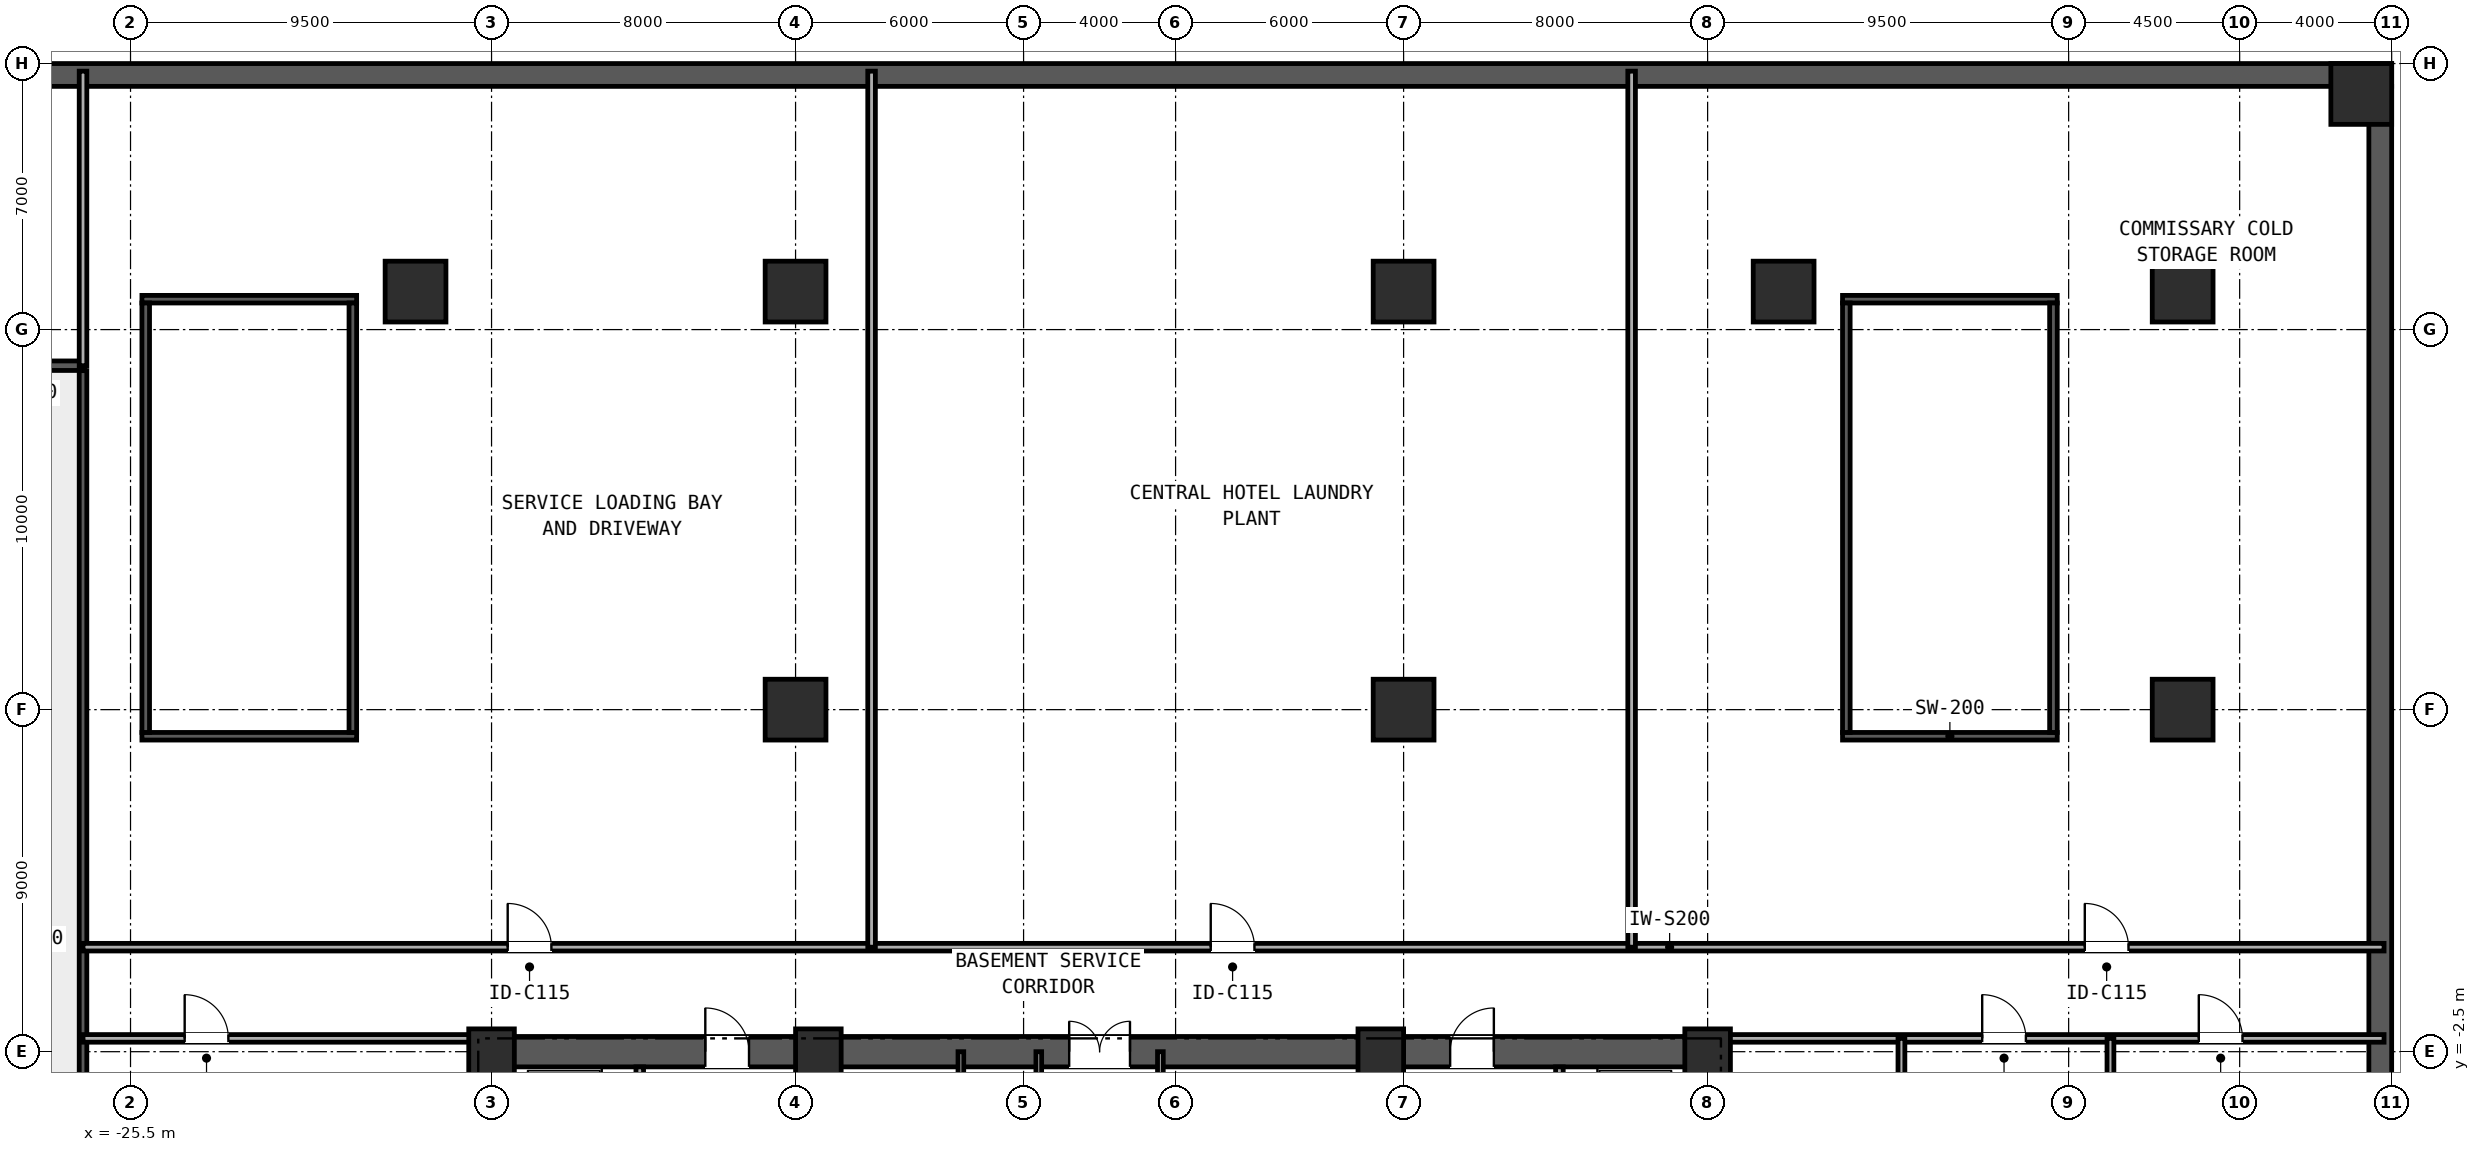
"""IFC4 building model, lengths in metres.
Left out: names, types, materials, properties, quantities, classifications, styles, units other than length and angle.
Written with IfcOpenShell. Run it as: python <this file> out.ifc"""

import sys

from ifc_helpers import new_model, si_unit, direction, frame, frame_2d, origin, origin_2d, place, context, subcontext, project, spatial, rectangle, extrude, element, fill, save


model = new_model("IFC4")
c1 = context("Model", 3, precision=1e-05, world=origin(), true_north=direction((0.0, 1.0)))
c2 = subcontext(c1, "Body", "Model", "MODEL_VIEW")
j1 = project(units=[si_unit("LENGTHUNIT", "METRE"), si_unit("PLANEANGLEUNIT", "RADIAN")], contexts=[c1])
p1 = place(None, origin())
s1 = spatial("IfcSite", under=j1, at=p1, CompositionType="ELEMENT")
p2 = place(p1, origin())
s2 = spatial("IfcBuilding", under=s1, at=p2, CompositionType="ELEMENT")
p3 = place(p2, frame((0.0, 0.0, -5.2)))
s3 = spatial("IfcBuildingStorey", under=s2, at=p3, CompositionType="ELEMENT", Elevation=-5.2)
p4 = place(p3, frame((-16.4, -2.5, 0.0), z_axis=(0.0, 0.0, 1.0), x_axis=(1.0, 0.0, 0.0)))
e1 = element("IfcWall", 1, at=p4, inside=s3, PredefinedType="SHEAR", context=c2, shape_type="SweptSolid", body=[
    extrude(rectangle(XDim=32.8, YDim=0.8, at=frame_2d((16.4, 0.0))), origin(), (0.0, 0.0, 1.0), 4.62),
])
p5 = place(p4, frame((6.025, 0.0, 0.0)))
e2 = element("IfcOpeningElement", 2, at=p5, cuts=e1, PredefinedType="OPENING", context=c2, shape_type="SweptSolid", body=[
    extrude(rectangle(XDim=1.15, YDim=2.0, at=frame_2d((0.575, 1.0))), frame((0.0, 0.41, 0.0), z_axis=(0.0, -1.0, 0.0), x_axis=(1.0, 0.0, 0.0)), (0.0, 0.0, 1.0), 0.82),
])
p6 = place(p4, frame((15.6, 0.0, 0.0)))
e3 = element("IfcOpeningElement", 3, at=p6, cuts=e1, PredefinedType="OPENING", context=c2, shape_type="SweptSolid", body=[
    extrude(rectangle(XDim=1.6, YDim=2.0, at=frame_2d((0.8, 1.0))), frame((0.0, 0.41, 0.0), z_axis=(0.0, -1.0, 0.0), x_axis=(1.0, 0.0, 0.0)), (0.0, 0.0, 1.0), 0.82),
])
p7 = place(p4, frame((25.625, 0.0, 0.0)))
e4 = element("IfcOpeningElement", 4, at=p7, cuts=e1, PredefinedType="OPENING", context=c2, shape_type="SweptSolid", body=[
    extrude(rectangle(XDim=1.15, YDim=2.0, at=frame_2d((0.575, 1.0))), frame((0.0, 0.41, 0.0), z_axis=(0.0, -1.0, 0.0), x_axis=(1.0, 0.0, 0.0)), (0.0, 0.0, 1.0), 0.82),
])
for number, where, z_axis, x_axis in (
    (5, (-16.0, -12.6, 0.0), (0.0, 0.0, 1.0), (0.0, 1.0, 0.0)),
    (6, (16.0, -12.6, 0.0), (0.0, 0.0, 1.0), (0.0, 1.0, 0.0)),
):
    element("IfcWall", number, at=place(p3, frame(where, z_axis=z_axis, x_axis=x_axis)), inside=s3, PredefinedType="SHEAR", context=c2, shape_type="SweptSolid", body=[
        extrude(rectangle(XDim=9.7, YDim=0.8, at=frame_2d((4.85, 0.0))), origin(), (0.0, 0.0, 1.0), 4.62),
    ])
for number, where, z_axis, x_axis in (
    (7, (-7.4, -12.6, 0.0), (0.0, 0.0, 1.0), (0.0, 1.0, 0.0)),
    (8, (7.4, -12.6, 0.0), (0.0, 0.0, 1.0), (0.0, 1.0, 0.0)),
):
    element("IfcWall", number, at=place(p3, frame(where, z_axis=z_axis, x_axis=x_axis)), inside=s3, PredefinedType="SHEAR", context=c2, shape_type="SweptSolid", body=[
        extrude(rectangle(XDim=9.7, YDim=0.4, at=frame_2d((4.85, 0.0))), origin(), (0.0, 0.0, 1.0), 4.9),
    ])
for number, where, z_axis, x_axis in (
    (9, (19.55, 5.8, 0.0), (0.0, 0.0, 1.0), (1.0, 0.0, 0.0)),
    (10, (19.55, 17.3, 0.0), (0.0, 0.0, 1.0), (1.0, 0.0, 0.0)),
):
    element("IfcWall", number, at=place(p3, frame(where, z_axis=z_axis, x_axis=x_axis)), inside=s3, PredefinedType="SOLIDWALL", context=c2, shape_type="SweptSolid", body=[
        extrude(rectangle(XDim=5.65, YDim=0.2, at=frame_2d((2.825, 0.0))), origin(), (0.0, 0.0, 1.0), 4.9),
    ])
for number, where, z_axis, x_axis in (
    (11, (19.65, 5.9, 0.0), (0.0, 0.0, 1.0), (0.0, 1.0, 0.0)),
    (12, (25.1, 5.9, 0.0), (0.0, 0.0, 1.0), (0.0, 1.0, 0.0)),
):
    element("IfcWall", number, at=place(p3, frame(where, z_axis=z_axis, x_axis=x_axis)), inside=s3, PredefinedType="SOLIDWALL", context=c2, shape_type="SweptSolid", body=[
        extrude(rectangle(XDim=11.3, YDim=0.2, at=frame_2d((5.65, 0.0))), origin(), (0.0, 0.0, 1.0), 4.9),
    ])
for number, where, z_axis, x_axis in (
    (13, (-25.2, 5.8, 0.0), (0.0, 0.0, 1.0), (1.0, 0.0, 0.0)),
    (14, (-25.2, 17.3, 0.0), (0.0, 0.0, 1.0), (1.0, 0.0, 0.0)),
):
    element("IfcWall", number, at=place(p3, frame(where, z_axis=z_axis, x_axis=x_axis)), inside=s3, PredefinedType="SOLIDWALL", context=c2, shape_type="SweptSolid", body=[
        extrude(rectangle(XDim=5.65, YDim=0.2, at=frame_2d((2.825, 0.0))), origin(), (0.0, 0.0, 1.0), 4.9),
    ])
for number, where, z_axis, x_axis in (
    (15, (-25.1, 5.9, 0.0), (0.0, 0.0, 1.0), (0.0, 1.0, 0.0)),
    (16, (-19.65, 5.9, 0.0), (0.0, 0.0, 1.0), (0.0, 1.0, 0.0)),
):
    element("IfcWall", number, at=place(p3, frame(where, z_axis=z_axis, x_axis=x_axis)), inside=s3, PredefinedType="SOLIDWALL", context=c2, shape_type="SweptSolid", body=[
        extrude(rectangle(XDim=11.3, YDim=0.2, at=frame_2d((5.65, 0.0))), origin(), (0.0, 0.0, 1.0), 4.9),
    ])
p8 = place(p3, frame((-30.0, 15.55, 0.0), z_axis=(0.0, 0.0, 1.0), x_axis=(1.0, 0.0, 0.0)))
e17 = element("IfcWall", 17, at=p8, inside=s3, PredefinedType="SOLIDWALL", context=c2, shape_type="SweptSolid", body=[
    extrude(rectangle(XDim=3.3, YDim=0.25, at=frame_2d((1.65, 0.0))), origin(), (0.0, 0.0, 1.0), 4.9),
])
p9 = place(p3, frame((-26.75, -16.0, 0.0), z_axis=(0.0, 0.0, 1.0), x_axis=(0.0, 1.0, 0.0)))
e18 = element("IfcWall", 18, at=p9, inside=s3, PredefinedType="SOLIDWALL", context=c2, shape_type="SweptSolid", body=[
    extrude(rectangle(XDim=31.42, YDim=0.2, at=frame_2d((15.71, 0.0))), origin(), (0.0, 0.0, 1.0), 4.9),
])
p10 = place(p3, frame((-34.0, 23.2, 0.0), z_axis=(0.0, 0.0, 1.0), x_axis=(1.0, 0.0, 0.0)))
e19 = element("IfcWall", 19, at=p10, inside=s3, PredefinedType="SOLIDWALL", context=c2, shape_type="SweptSolid", body=[
    extrude(rectangle(XDim=68.0, YDim=0.6, at=frame_2d((34.0, 0.0))), origin(), (0.0, 0.0, 1.0), 4.9),
])
p11 = place(p3, frame((33.7, -22.9, 0.0), z_axis=(0.0, 0.0, 1.0), x_axis=(0.0, 1.0, 0.0)))
e20 = element("IfcWall", 20, at=p11, inside=s3, PredefinedType="SOLIDWALL", context=c2, shape_type="SweptSolid", body=[
    extrude(rectangle(XDim=45.8, YDim=0.6, at=frame_2d((22.9, 0.0))), origin(), (0.0, 0.0, 1.0), 4.9),
])
for number, where, z_axis, x_axis in (
    (21, (-16.0, -2.5, 0.0), (0.0, 0.0, 1.0), (1.0, 0.0, 0.0)),
    (22, (-7.4, -2.5, 0.0), (0.0, 0.0, 1.0), (1.0, 0.0, 0.0)),
    (23, (7.4, -2.5, 0.0), (0.0, 0.0, 1.0), (1.0, 0.0, 0.0)),
    (24, (16.0, -2.5, 0.0), (0.0, 0.0, 1.0), (1.0, 0.0, 0.0)),
):
    element("IfcColumn", number, at=place(p3, frame(where, z_axis=z_axis, x_axis=x_axis)), inside=s3, PredefinedType="COLUMN", context=c2, shape_type="SweptSolid", body=[
        extrude(rectangle(XDim=1.2, YDim=1.2, at=origin_2d()), origin(), (0.0, 0.0, 1.0), 5.2),
    ])
for number, where, z_axis, x_axis in (
    (25, (33.2, 22.7, 0.0), (0.0, 0.0, 1.0), (1.0, 0.0, 0.0)),
    (26, (-8.0, 6.5, 0.0), (0.0, 0.0, 1.0), (1.0, 0.0, 0.0)),
    (27, (8.0, 6.5, 0.0), (0.0, 0.0, 1.0), (1.0, 0.0, 0.0)),
    (28, (28.5, 6.5, 0.0), (0.0, 0.0, 1.0), (1.0, 0.0, 0.0)),
    (29, (-18.0, 17.5, 0.0), (0.0, 0.0, 1.0), (1.0, 0.0, 0.0)),
    (30, (-8.0, 17.5, 0.0), (0.0, 0.0, 1.0), (1.0, 0.0, 0.0)),
    (31, (8.0, 17.5, 0.0), (0.0, 0.0, 1.0), (1.0, 0.0, 0.0)),
    (32, (18.0, 17.5, 0.0), (0.0, 0.0, 1.0), (1.0, 0.0, 0.0)),
    (33, (28.5, 17.5, 0.0), (0.0, 0.0, 1.0), (1.0, 0.0, 0.0)),
):
    element("IfcColumn", number, at=place(p3, frame(where, z_axis=z_axis, x_axis=x_axis)), inside=s3, PredefinedType="COLUMN", context=c2, shape_type="SweptSolid", body=[
        extrude(rectangle(XDim=1.6, YDim=1.6, at=origin_2d()), origin(), (0.0, 0.0, 1.0), 5.2),
    ])
p12 = place(p3, frame((-12.1, -5.2, 0.0), z_axis=(0.0, 0.0, 1.0), x_axis=(0.0, 1.0, 0.0)))
e34 = element("IfcWall", 34, at=p12, inside=s3, PredefinedType="PARTITIONING", context=c2, shape_type="SweptSolid", body=[
    extrude(rectangle(XDim=2.3, YDim=0.2, at=frame_2d((1.15, 0.0))), origin(), (0.0, 0.0, 1.0), 4.9),
])
p13 = place(p12, frame((0.825, 0.0, 0.0)))
e35 = element("IfcOpeningElement", 35, at=p13, cuts=e34, PredefinedType="OPENING", context=c2, shape_type="SweptSolid", body=[
    extrude(rectangle(XDim=0.85, YDim=2.05, at=frame_2d((0.425, 1.025))), frame((0.0, 0.11, 0.0), z_axis=(0.0, -1.0, 0.0), x_axis=(1.0, 0.0, 0.0)), (0.0, 0.0, 1.0), 0.22),
])
p14 = place(p3, frame((12.1, -5.2, 0.0), z_axis=(0.0, 0.0, 1.0), x_axis=(0.0, 1.0, 0.0)))
e36 = element("IfcWall", 36, at=p14, inside=s3, PredefinedType="PARTITIONING", context=c2, shape_type="SweptSolid", body=[
    extrude(rectangle(XDim=2.3, YDim=0.2, at=frame_2d((1.15, 0.0))), origin(), (0.0, 0.0, 1.0), 4.9),
])
p15 = place(p14, frame((0.825, 0.0, 0.0)))
e37 = element("IfcOpeningElement", 37, at=p15, cuts=e36, PredefinedType="OPENING", context=c2, shape_type="SweptSolid", body=[
    extrude(rectangle(XDim=0.85, YDim=2.05, at=frame_2d((0.425, 1.025))), frame((0.0, 0.11, 0.0), z_axis=(0.0, -1.0, 0.0), x_axis=(1.0, 0.0, 0.0)), (0.0, 0.0, 1.0), 0.22),
])
for number, where, z_axis, x_axis in (
    (38, (-1.6, -6.0, 0.0), (0.0, 0.0, 1.0), (0.0, 1.0, 0.0)),
    (39, (1.6, -6.0, 0.0), (0.0, 0.0, 1.0), (0.0, 1.0, 0.0)),
    (40, (-3.65, -6.0, 0.0), (0.0, 0.0, 1.0), (0.0, 1.0, 0.0)),
):
    element("IfcWall", number, at=place(p3, frame(where, z_axis=z_axis, x_axis=x_axis)), inside=s3, PredefinedType="PARTITIONING", context=c2, shape_type="SweptSolid", body=[
        extrude(rectangle(XDim=3.5, YDim=0.15, at=frame_2d((1.75, 0.0))), origin(), (0.0, 0.0, 1.0), 4.03),
    ])
p16 = place(p3, frame((-26.75, 0.25, 0.0), z_axis=(0.0, 0.0, 1.0), x_axis=(1.0, 0.0, 0.0)))
e41 = element("IfcWall", 41, at=p16, inside=s3, PredefinedType="PARTITIONING", context=c2, shape_type="SweptSolid", body=[
    extrude(rectangle(XDim=60.55, YDim=0.2, at=frame_2d((30.275, 0.0))), origin(), (0.0, 0.0, 1.0), 4.03),
])
p17 = place(p16, frame((11.175, 0.0, 0.0)))
e42 = element("IfcOpeningElement", 42, at=p17, cuts=e41, PredefinedType="OPENING", context=c2, shape_type="SweptSolid", body=[
    extrude(rectangle(XDim=1.15, YDim=2.2, at=frame_2d((0.575, 1.1))), frame((0.0, 0.11, 0.0), z_axis=(0.0, -1.0, 0.0), x_axis=(1.0, 0.0, 0.0)), (0.0, 0.0, 1.0), 0.22),
])
p18 = place(p16, frame((29.675, 0.0, 0.0)))
e43 = element("IfcOpeningElement", 43, at=p18, cuts=e41, PredefinedType="OPENING", context=c2, shape_type="SweptSolid", body=[
    extrude(rectangle(XDim=1.15, YDim=2.2, at=frame_2d((0.575, 1.1))), frame((0.0, 0.11, 0.0), z_axis=(0.0, -1.0, 0.0), x_axis=(1.0, 0.0, 0.0)), (0.0, 0.0, 1.0), 0.22),
])
p19 = place(p16, frame((52.675, 0.0, 0.0)))
e44 = element("IfcOpeningElement", 44, at=p19, cuts=e41, PredefinedType="OPENING", context=c2, shape_type="SweptSolid", body=[
    extrude(rectangle(XDim=1.15, YDim=2.2, at=frame_2d((0.575, 1.1))), frame((0.0, 0.11, 0.0), z_axis=(0.0, -1.0, 0.0), x_axis=(1.0, 0.0, 0.0)), (0.0, 0.0, 1.0), 0.22),
])
p20 = place(p3, frame((-26.75, -2.15, 0.0), z_axis=(0.0, 0.0, 1.0), x_axis=(1.0, 0.0, 0.0)))
e45 = element("IfcWall", 45, at=p20, inside=s3, PredefinedType="PARTITIONING", context=c2, shape_type="SweptSolid", body=[
    extrude(rectangle(XDim=10.75, YDim=0.2, at=frame_2d((5.375, 0.0))), origin(), (0.0, 0.0, 1.0), 4.03),
])
p21 = place(p20, frame((2.675, 0.0, 0.0)))
e46 = element("IfcOpeningElement", 46, at=p21, cuts=e45, PredefinedType="OPENING", context=c2, shape_type="SweptSolid", body=[
    extrude(rectangle(XDim=1.15, YDim=2.2, at=frame_2d((0.575, 1.1))), frame((0.0, 0.11, 0.0), z_axis=(0.0, -1.0, 0.0), x_axis=(1.0, 0.0, 0.0)), (0.0, 0.0, 1.0), 0.22),
])
p22 = place(p3, frame((16.0, -2.15, 0.0), z_axis=(0.0, 0.0, 1.0), x_axis=(1.0, 0.0, 0.0)))
e47 = element("IfcWall", 47, at=p22, inside=s3, PredefinedType="PARTITIONING", context=c2, shape_type="SweptSolid", body=[
    extrude(rectangle(XDim=17.8, YDim=0.2, at=frame_2d((8.9, 0.0))), origin(), (0.0, 0.0, 1.0), 4.03),
])
p23 = place(p22, frame((7.225, 0.0, 0.0)))
e48 = element("IfcOpeningElement", 48, at=p23, cuts=e47, PredefinedType="OPENING", context=c2, shape_type="SweptSolid", body=[
    extrude(rectangle(XDim=1.15, YDim=2.2, at=frame_2d((0.575, 1.1))), frame((0.0, 0.11, 0.0), z_axis=(0.0, -1.0, 0.0), x_axis=(1.0, 0.0, 0.0)), (0.0, 0.0, 1.0), 0.22),
])
p24 = place(p22, frame((12.925, 0.0, 0.0)))
e49 = element("IfcOpeningElement", 49, at=p24, cuts=e47, PredefinedType="OPENING", context=c2, shape_type="SweptSolid", body=[
    extrude(rectangle(XDim=1.15, YDim=2.2, at=frame_2d((0.575, 1.1))), frame((0.0, 0.11, 0.0), z_axis=(0.0, -1.0, 0.0), x_axis=(1.0, 0.0, 0.0)), (0.0, 0.0, 1.0), 0.22),
])
p25 = place(p3, frame((-6.0, 0.25, 0.0), z_axis=(0.0, 0.0, 1.0), x_axis=(0.0, 1.0, 0.0)))
e50 = element("IfcWall", 50, at=p25, inside=s3, PredefinedType="PARTITIONING", context=c2, shape_type="SweptSolid", body=[
    extrude(rectangle(XDim=23.05, YDim=0.2, at=frame_2d((11.525, 0.0))), origin(), (0.0, 0.0, 1.0), 3.942),
])
p26 = place(p3, frame((14.0, 0.25, 0.0), z_axis=(0.0, 0.0, 1.0), x_axis=(0.0, 1.0, 0.0)))
e51 = element("IfcWall", 51, at=p26, inside=s3, PredefinedType="PARTITIONING", context=c2, shape_type="SweptSolid", body=[
    extrude(rectangle(XDim=23.05, YDim=0.2, at=frame_2d((11.525, 0.0))), origin(), (0.0, 0.0, 1.0), 4.112),
])
p27 = place(p3, frame((-26.75, 15.55, 0.0), z_axis=(0.0, 0.0, 1.0), x_axis=(0.0, 1.0, 0.0)))
e52 = element("IfcWall", 52, at=p27, inside=s3, PredefinedType="PARTITIONING", context=c2, shape_type="SweptSolid", body=[
    extrude(rectangle(XDim=7.75, YDim=0.2, at=frame_2d((3.875, 0.0))), origin(), (0.0, 0.0, 1.0), 4.112),
])
for number, where, z_axis, x_axis in (
    (53, (21.1, -11.3, 0.0), (0.0, 0.0, 1.0), (0.0, 1.0, 0.0)),
    (54, (26.6, -11.3, 0.0), (0.0, 0.0, 1.0), (0.0, 1.0, 0.0)),
):
    element("IfcWall", number, at=place(p3, frame(where, z_axis=z_axis, x_axis=x_axis)), inside=s3, PredefinedType="PARTITIONING", context=c2, shape_type="SweptSolid", body=[
        extrude(rectangle(XDim=9.15, YDim=0.18, at=frame_2d((4.575, 0.0))), origin(), (0.0, 0.0, 1.0), 4.03),
    ])
p28 = place(p5, origin())
e55 = element("IfcDoor", 55, at=p28, inside=s3, OperationType="SINGLE_SWING_LEFT", PredefinedType="DOOR", context=c2, shape_type="SweptSolid", body=[
    extrude(rectangle(XDim=1.15, YDim=2.0, at=frame_2d((0.575, 1.0))), frame((0.0, 0.025, 0.0), z_axis=(0.0, -1.0, 0.0), x_axis=(1.0, 0.0, 0.0)), (0.0, 0.0, 1.0), 0.05),
])
fill(e2, e55)
p29 = place(p6, origin())
e56 = element("IfcDoor", 56, at=p29, inside=s3, OperationType="DOUBLE_DOOR_SINGLE_SWING", PredefinedType="DOOR", context=c2, shape_type="SweptSolid", body=[
    extrude(rectangle(XDim=1.6, YDim=2.0, at=frame_2d((0.8, 1.0))), frame((0.0, 0.025, 0.0), z_axis=(0.0, -1.0, 0.0), x_axis=(1.0, 0.0, 0.0)), (0.0, 0.0, 1.0), 0.05),
])
fill(e3, e56)
p30 = place(p7, origin())
e57 = element("IfcDoor", 57, at=p30, inside=s3, OperationType="SINGLE_SWING_RIGHT", PredefinedType="DOOR", context=c2, shape_type="SweptSolid", body=[
    extrude(rectangle(XDim=1.15, YDim=2.0, at=frame_2d((0.575, 1.0))), frame((0.0, 0.025, 0.0), z_axis=(0.0, -1.0, 0.0), x_axis=(1.0, 0.0, 0.0)), (0.0, 0.0, 1.0), 0.05),
])
fill(e4, e57)
p31 = place(p17, origin())
e58 = element("IfcDoor", 58, at=p31, inside=s3, OperationType="SINGLE_SWING_LEFT", PredefinedType="DOOR", context=c2, shape_type="SweptSolid", body=[
    extrude(rectangle(XDim=1.15, YDim=2.2, at=frame_2d((0.575, 1.1))), frame((0.0, 0.025, 0.0), z_axis=(0.0, -1.0, 0.0), x_axis=(1.0, 0.0, 0.0)), (0.0, 0.0, 1.0), 0.05),
])
fill(e42, e58)
p32 = place(p18, origin())
e59 = element("IfcDoor", 59, at=p32, inside=s3, OperationType="SINGLE_SWING_LEFT", PredefinedType="DOOR", context=c2, shape_type="SweptSolid", body=[
    extrude(rectangle(XDim=1.15, YDim=2.2, at=frame_2d((0.575, 1.1))), frame((0.0, 0.025, 0.0), z_axis=(0.0, -1.0, 0.0), x_axis=(1.0, 0.0, 0.0)), (0.0, 0.0, 1.0), 0.05),
])
fill(e43, e59)
p33 = place(p19, origin())
e60 = element("IfcDoor", 60, at=p33, inside=s3, OperationType="SINGLE_SWING_LEFT", PredefinedType="DOOR", context=c2, shape_type="SweptSolid", body=[
    extrude(rectangle(XDim=1.15, YDim=2.2, at=frame_2d((0.575, 1.1))), frame((0.0, 0.025, 0.0), z_axis=(0.0, -1.0, 0.0), x_axis=(1.0, 0.0, 0.0)), (0.0, 0.0, 1.0), 0.05),
])
fill(e44, e60)
p34 = place(p23, origin())
e61 = element("IfcDoor", 61, at=p34, inside=s3, OperationType="SINGLE_SWING_LEFT", PredefinedType="DOOR", context=c2, shape_type="SweptSolid", body=[
    extrude(rectangle(XDim=1.15, YDim=2.2, at=frame_2d((0.575, 1.1))), frame((0.0, 0.025, 0.0), z_axis=(0.0, -1.0, 0.0), x_axis=(1.0, 0.0, 0.0)), (0.0, 0.0, 1.0), 0.05),
])
fill(e48, e61)
p35 = place(p24, origin())
e62 = element("IfcDoor", 62, at=p35, inside=s3, OperationType="SINGLE_SWING_LEFT", PredefinedType="DOOR", context=c2, shape_type="SweptSolid", body=[
    extrude(rectangle(XDim=1.15, YDim=2.2, at=frame_2d((0.575, 1.1))), frame((0.0, 0.025, 0.0), z_axis=(0.0, -1.0, 0.0), x_axis=(1.0, 0.0, 0.0)), (0.0, 0.0, 1.0), 0.05),
])
fill(e49, e62)
p36 = place(p21, origin())
e63 = element("IfcDoor", 63, at=p36, inside=s3, OperationType="SINGLE_SWING_LEFT", PredefinedType="DOOR", context=c2, shape_type="SweptSolid", body=[
    extrude(rectangle(XDim=1.15, YDim=2.2, at=frame_2d((0.575, 1.1))), frame((0.0, 0.025, 0.0), z_axis=(0.0, -1.0, 0.0), x_axis=(1.0, 0.0, 0.0)), (0.0, 0.0, 1.0), 0.05),
])
fill(e46, e63)
save(model, sys.argv[1])
